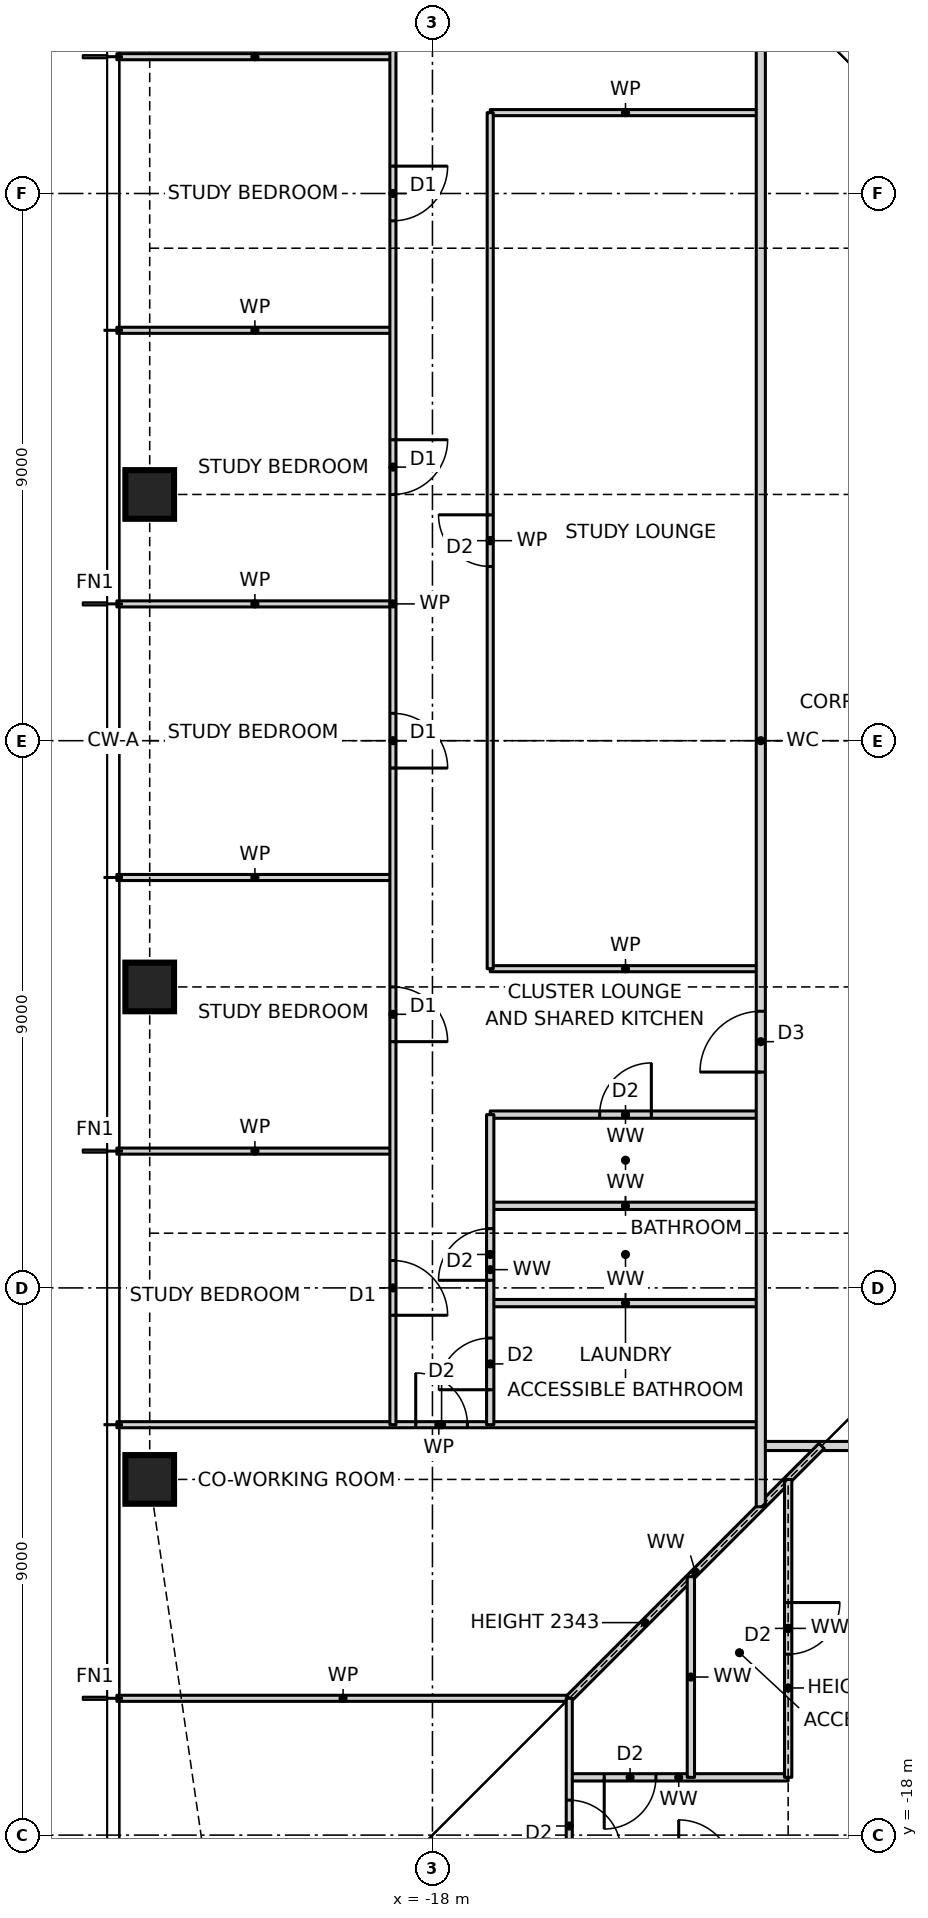
"""IFC4 building model, lengths in metres.
Left out: names, types, materials, properties, quantities, classifications, styles, units other than length and angle.
Written with IfcOpenShell. Run it as: python <this file> out.ifc"""

import sys

from ifc_helpers import new_model, si_unit, direction, frame, frame_2d, origin, origin_2d, place, context, subcontext, project, spatial, rectangle, hollow_rectangle, extrude, element, fill, save


model = new_model("IFC4")
c1 = context("Model", 3, precision=1e-05, world=origin(), true_north=direction((0.0, 1.0)))
c2 = subcontext(c1, "Body", "Model", "MODEL_VIEW")
j1 = project(units=[si_unit("LENGTHUNIT", "METRE"), si_unit("PLANEANGLEUNIT", "RADIAN")], contexts=[c1])
p1 = place(None, origin())
s1 = spatial("IfcSite", under=j1, at=p1, CompositionType="ELEMENT")
p2 = place(p1, origin())
s2 = spatial("IfcBuilding", under=s1, at=p2, CompositionType="ELEMENT")
p3 = place(p2, frame((0.0, 0.0, 46.5)))
s3 = spatial("IfcBuildingStorey", under=s2, at=p3, CompositionType="ELEMENT", Elevation=46.5)
for number, where, z_axis, x_axis in (
    (1, (-22.65, 4.05, 0.0), (0.0, 0.0, 1.0), (1.0, 0.0, 0.0)),
    (2, (-22.65, -4.05, 0.0), (0.0, 0.0, 1.0), (1.0, 0.0, 0.0)),
    (3, (-22.65, -12.15, 0.0), (0.0, 0.0, 1.0), (1.0, 0.0, 0.0)),
):
    element("IfcColumn", number, at=place(p3, frame(where, z_axis=z_axis, x_axis=x_axis)), inside=s3, PredefinedType="COLUMN", context=c2, shape_type="SweptSolid", body=[
        extrude(hollow_rectangle(XDim=0.8, YDim=0.8, WallThickness=0.09, at=origin_2d()), origin(), (0.0, 0.0, 1.0), 3.5),
    ])
p4 = place(p3, frame((-15.75, -17.05, 0.0), z_axis=(0.0, 0.0, 1.0), x_axis=(1.0, 0.0, 0.0)))
e4 = element("IfcWall", 4, at=p4, inside=s3, PredefinedType="PARTITIONING", context=c2, shape_type="SweptSolid", body=[
    extrude(rectangle(XDim=3.6, YDim=0.12, at=frame_2d((1.8, 0.0))), origin(), (0.0, 0.0, 1.0), 3.27),
])
p5 = place(p4, frame((0.575, 0.0, 0.0)))
e5 = element("IfcOpeningElement", 5, at=p5, cuts=e4, PredefinedType="OPENING", context=c2, shape_type="SweptSolid", body=[
    extrude(rectangle(XDim=0.85, YDim=2.1, at=frame_2d((0.425, 1.05))), frame((0.0, 0.07, 0.0), z_axis=(0.0, -1.0, 0.0), x_axis=(1.0, 0.0, 0.0)), (0.0, 0.0, 1.0), 0.14),
])
p6 = place(p3, frame((-23.19, -15.75, 0.0), z_axis=(0.0, 0.0, 1.0), x_axis=(1.0, 0.0, 0.0)))
e6 = element("IfcWall", 6, at=p6, inside=s3, PredefinedType="PARTITIONING", context=c2, shape_type="SweptSolid", body=[
    extrude(rectangle(XDim=7.44, YDim=0.1, at=frame_2d((3.72, 0.0))), origin(), (0.0, 0.0, 1.0), 3.27),
])
p7 = place(p3, frame((-12.6, -11.6, 0.0), z_axis=(0.0, 0.0, 1.0), x_axis=(1.0, 0.0, 0.0)))
e7 = element("IfcWall", 7, at=p7, inside=s3, PredefinedType="PARTITIONING", context=c2, shape_type="SweptSolid", body=[
    extrude(rectangle(XDim=24.2, YDim=0.15, at=frame_2d((12.1, 0.0))), origin(), (0.0, 0.0, 1.0), 3.27),
])
p8 = place(p7, frame((2.64, 0.0, 0.0)))
e8 = element("IfcOpeningElement", 8, at=p8, cuts=e7, PredefinedType="OPENING", context=c2, shape_type="SweptSolid", body=[
    extrude(rectangle(XDim=1.0, YDim=2.1, at=frame_2d((0.5, 1.05))), frame((0.0, 0.085, 0.0), z_axis=(0.0, -1.0, 0.0), x_axis=(1.0, 0.0, 0.0)), (0.0, 0.0, 1.0), 0.17),
])
p9 = place(p7, frame((13.5, 0.0, 0.0)))
e9 = element("IfcOpeningElement", 9, at=p9, cuts=e7, PredefinedType="OPENING", context=c2, shape_type="SweptSolid", body=[
    extrude(rectangle(XDim=0.9, YDim=2.1, at=frame_2d((0.45, 1.05))), frame((0.0, 0.085, 0.0), z_axis=(0.0, -1.0, 0.0), x_axis=(1.0, 0.0, 0.0)), (0.0, 0.0, 1.0), 0.17),
])
p10 = place(p7, frame((22.025, 0.0, 0.0)))
e10 = element("IfcOpeningElement", 10, at=p10, cuts=e7, PredefinedType="OPENING", context=c2, shape_type="SweptSolid", body=[
    extrude(rectangle(XDim=1.0, YDim=2.1, at=frame_2d((0.5, 1.05))), frame((0.0, 0.085, 0.0), z_axis=(0.0, -1.0, 0.0), x_axis=(1.0, 0.0, 0.0)), (0.0, 0.0, 1.0), 0.17),
])
p11 = place(p3, frame((-23.19, -11.25, 0.0), z_axis=(0.0, 0.0, 1.0), x_axis=(1.0, 0.0, 0.0)))
e11 = element("IfcWall", 11, at=p11, inside=s3, PredefinedType="PARTITIONING", context=c2, shape_type="SweptSolid", body=[
    extrude(rectangle(XDim=10.59, YDim=0.1, at=frame_2d((5.295, 0.0))), origin(), (0.0, 0.0, 1.0), 3.27),
])
p12 = place(p11, frame((4.915, 0.0, 0.0)))
e12 = element("IfcOpeningElement", 12, at=p12, cuts=e11, PredefinedType="OPENING", context=c2, shape_type="SweptSolid", body=[
    extrude(rectangle(XDim=0.85, YDim=2.1, at=frame_2d((0.425, 1.05))), frame((0.0, 0.06, 0.0), z_axis=(0.0, -1.0, 0.0), x_axis=(1.0, 0.0, 0.0)), (0.0, 0.0, 1.0), 0.12),
])
for number, where, z_axis, x_axis in (
    (13, (-17.05, -9.25, 0.0), (0.0, 0.0, 1.0), (1.0, 0.0, 0.0)),
    (14, (-17.05, -7.65, 0.0), (0.0, 0.0, 1.0), (1.0, 0.0, 0.0)),
):
    element("IfcWall", number, at=place(p3, frame(where, z_axis=z_axis, x_axis=x_axis)), inside=s3, PredefinedType="PARTITIONING", context=c2, shape_type="SweptSolid", body=[
        extrude(rectangle(XDim=4.45, YDim=0.12, at=frame_2d((2.225, 0.0))), origin(), (0.0, 0.0, 1.0), 3.27),
    ])
p13 = place(p3, frame((-23.19, -6.75, 0.0), z_axis=(0.0, 0.0, 1.0), x_axis=(1.0, 0.0, 0.0)))
e15 = element("IfcWall", 15, at=p13, inside=s3, PredefinedType="PARTITIONING", context=c2, shape_type="SweptSolid", body=[
    extrude(rectangle(XDim=4.54, YDim=0.1, at=frame_2d((2.27, 0.0))), origin(), (0.0, 0.0, 1.0), 3.27),
])
p14 = place(p3, frame((-17.05, -6.15, 0.0), z_axis=(0.0, 0.0, 1.0), x_axis=(1.0, 0.0, 0.0)))
e16 = element("IfcWall", 16, at=p14, inside=s3, PredefinedType="PARTITIONING", context=c2, shape_type="SweptSolid", body=[
    extrude(rectangle(XDim=4.45, YDim=0.12, at=frame_2d((2.225, 0.0))), origin(), (0.0, 0.0, 1.0), 3.27),
])
p15 = place(p14, frame((1.8, 0.0, 0.0)))
e17 = element("IfcOpeningElement", 17, at=p15, cuts=e16, PredefinedType="OPENING", context=c2, shape_type="SweptSolid", body=[
    extrude(rectangle(XDim=0.85, YDim=2.1, at=frame_2d((0.425, 1.05))), frame((0.0, 0.07, 0.0), z_axis=(0.0, -1.0, 0.0), x_axis=(1.0, 0.0, 0.0)), (0.0, 0.0, 1.0), 0.14),
])
p16 = place(p3, frame((-17.05, -3.75, 0.0), z_axis=(0.0, 0.0, 1.0), x_axis=(1.0, 0.0, 0.0)))
e18 = element("IfcWall", 18, at=p16, inside=s3, PredefinedType="PARTITIONING", context=c2, shape_type="SweptSolid", body=[
    extrude(rectangle(XDim=4.45, YDim=0.1, at=frame_2d((2.225, 0.0))), origin(), (0.0, 0.0, 1.0), 3.27),
])
for number, where, z_axis, x_axis in (
    (19, (-23.19, -2.25, 0.0), (0.0, 0.0, 1.0), (1.0, 0.0, 0.0)),
    (20, (-23.19, 2.25, 0.0), (0.0, 0.0, 1.0), (1.0, 0.0, 0.0)),
    (21, (-23.19, 6.75, 0.0), (0.0, 0.0, 1.0), (1.0, 0.0, 0.0)),
):
    element("IfcWall", number, at=place(p3, frame(where, z_axis=z_axis, x_axis=x_axis)), inside=s3, PredefinedType="PARTITIONING", context=c2, shape_type="SweptSolid", body=[
        extrude(rectangle(XDim=4.54, YDim=0.1, at=frame_2d((2.27, 0.0))), origin(), (0.0, 0.0, 1.0), 3.27),
    ])
p17 = place(p3, frame((-17.05, 10.33, 0.0), z_axis=(0.0, 0.0, 1.0), x_axis=(1.0, 0.0, 0.0)))
e22 = element("IfcWall", 22, at=p17, inside=s3, PredefinedType="PARTITIONING", context=c2, shape_type="SweptSolid", body=[
    extrude(rectangle(XDim=4.45, YDim=0.1, at=frame_2d((2.225, 0.0))), origin(), (0.0, 0.0, 1.0), 3.27),
])
p18 = place(p3, frame((-23.19, 11.25, 0.0), z_axis=(0.0, 0.0, 1.0), x_axis=(1.0, 0.0, 0.0)))
e23 = element("IfcWall", 23, at=p18, inside=s3, PredefinedType="PARTITIONING", context=c2, shape_type="SweptSolid", body=[
    extrude(rectangle(XDim=4.54, YDim=0.1, at=frame_2d((2.27, 0.0))), origin(), (0.0, 0.0, 1.0), 3.27),
])
p19 = place(p3, frame((-15.75, -15.75, 0.0), z_axis=(0.0, 0.0, 1.0), x_axis=(0.707106781187, 0.707106781187, 0.0)))
e24 = element("IfcWall", 24, at=p19, inside=s3, PredefinedType="PARTITIONING", context=c2, shape_type="SweptSolid", body=[
    extrude(rectangle(XDim=5.869, YDim=0.12, at=frame_2d((2.935, 0.0))), origin(), (0.0, 0.0, 1.0), 2.343),
])
p20 = place(p3, frame((-12.15, -17.05, 0.0), z_axis=(0.0, 0.0, 1.0), x_axis=(0.0, 1.0, 0.0)))
e25 = element("IfcWall", 25, at=p20, inside=s3, PredefinedType="PARTITIONING", context=c2, shape_type="SweptSolid", body=[
    extrude(rectangle(XDim=4.9, YDim=0.12, at=frame_2d((2.45, 0.0))), origin(), (0.0, 0.0, 1.0), 2.508),
])
p21 = place(p20, frame((2.025, 0.0, 0.0)))
e26 = element("IfcOpeningElement", 26, at=p21, cuts=e25, PredefinedType="OPENING", context=c2, shape_type="SweptSolid", body=[
    extrude(rectangle(XDim=0.85, YDim=2.1, at=frame_2d((0.425, 1.05))), frame((0.0, 0.07, 0.0), z_axis=(0.0, -1.0, 0.0), x_axis=(1.0, 0.0, 0.0)), (0.0, 0.0, 1.0), 0.14),
])
p22 = place(p3, frame((-12.6, -12.6, 0.0), z_axis=(0.0, 0.0, 1.0), x_axis=(0.0, 1.0, 0.0)))
e27 = element("IfcWall", 27, at=p22, inside=s3, PredefinedType="PARTITIONING", context=c2, shape_type="SweptSolid", body=[
    extrude(rectangle(XDim=25.2, YDim=0.15, at=frame_2d((12.6, 0.0))), origin(), (0.0, 0.0, 1.0), 3.27),
])
p23 = place(p22, frame((7.15, 0.0, 0.0)))
e28 = element("IfcOpeningElement", 28, at=p23, cuts=e27, PredefinedType="OPENING", context=c2, shape_type="SweptSolid", body=[
    extrude(rectangle(XDim=1.0, YDim=2.1, at=frame_2d((0.5, 1.05))), frame((0.0, 0.085, 0.0), z_axis=(0.0, -1.0, 0.0), x_axis=(1.0, 0.0, 0.0)), (0.0, 0.0, 1.0), 0.17),
])
p24 = place(p3, frame((-13.75, -17.05, 0.0), z_axis=(0.0, 0.0, 1.0), x_axis=(0.0, 1.0, 0.0)))
e29 = element("IfcWall", 29, at=p24, inside=s3, PredefinedType="PARTITIONING", context=c2, shape_type="SweptSolid", body=[
    extrude(rectangle(XDim=3.3, YDim=0.12, at=frame_2d((1.65, 0.0))), origin(), (0.0, 0.0, 1.0), 3.27),
])
p25 = place(p3, frame((-15.75, -23.19, 0.0), z_axis=(0.0, 0.0, 1.0), x_axis=(0.0, 1.0, 0.0)))
e30 = element("IfcWall", 30, at=p25, inside=s3, PredefinedType="PARTITIONING", context=c2, shape_type="SweptSolid", body=[
    extrude(rectangle(XDim=7.44, YDim=0.1, at=frame_2d((3.72, 0.0))), origin(), (0.0, 0.0, 1.0), 3.27),
])
p26 = place(p25, frame((4.915, 0.0, 0.0)))
e31 = element("IfcOpeningElement", 31, at=p26, cuts=e30, PredefinedType="OPENING", context=c2, shape_type="SweptSolid", body=[
    extrude(rectangle(XDim=0.85, YDim=2.1, at=frame_2d((0.425, 1.05))), frame((0.0, 0.06, 0.0), z_axis=(0.0, -1.0, 0.0), x_axis=(1.0, 0.0, 0.0)), (0.0, 0.0, 1.0), 0.12),
])
p27 = place(p3, frame((-17.05, -11.25, 0.0), z_axis=(0.0, 0.0, 1.0), x_axis=(0.0, 1.0, 0.0)))
e32 = element("IfcWall", 32, at=p27, inside=s3, PredefinedType="PARTITIONING", context=c2, shape_type="SweptSolid", body=[
    extrude(rectangle(XDim=5.1, YDim=0.12, at=frame_2d((2.55, 0.0))), origin(), (0.0, 0.0, 1.0), 3.27),
])
p28 = place(p27, frame((2.375, 0.0, 0.0)))
e33 = element("IfcOpeningElement", 33, at=p28, cuts=e32, PredefinedType="OPENING", context=c2, shape_type="SweptSolid", body=[
    extrude(rectangle(XDim=0.85, YDim=2.1, at=frame_2d((0.425, 1.05))), frame((0.0, 0.07, 0.0), z_axis=(0.0, -1.0, 0.0), x_axis=(1.0, 0.0, 0.0)), (0.0, 0.0, 1.0), 0.14),
])
p29 = place(p27, frame((0.575, 0.0, 0.0)))
e34 = element("IfcOpeningElement", 34, at=p29, cuts=e32, PredefinedType="OPENING", context=c2, shape_type="SweptSolid", body=[
    extrude(rectangle(XDim=0.85, YDim=2.1, at=frame_2d((0.425, 1.05))), frame((0.0, 0.07, 0.0), z_axis=(0.0, -1.0, 0.0), x_axis=(1.0, 0.0, 0.0)), (0.0, 0.0, 1.0), 0.14),
])
p30 = place(p3, frame((-17.05, -3.75, 0.0), z_axis=(0.0, 0.0, 1.0), x_axis=(0.0, 1.0, 0.0)))
e35 = element("IfcWall", 35, at=p30, inside=s3, PredefinedType="PARTITIONING", context=c2, shape_type="SweptSolid", body=[
    extrude(rectangle(XDim=14.08, YDim=0.1, at=frame_2d((7.04, 0.0))), origin(), (0.0, 0.0, 1.0), 3.27),
])
p31 = place(p30, frame((6.615, 0.0, 0.0)))
e36 = element("IfcOpeningElement", 36, at=p31, cuts=e35, PredefinedType="OPENING", context=c2, shape_type="SweptSolid", body=[
    extrude(rectangle(XDim=0.85, YDim=2.1, at=frame_2d((0.425, 1.05))), frame((0.0, 0.06, 0.0), z_axis=(0.0, -1.0, 0.0), x_axis=(1.0, 0.0, 0.0)), (0.0, 0.0, 1.0), 0.12),
])
p32 = place(p3, frame((-18.65, -11.25, 0.0), z_axis=(0.0, 0.0, 1.0), x_axis=(0.0, 1.0, 0.0)))
e37 = element("IfcWall", 37, at=p32, inside=s3, PredefinedType="PARTITIONING", context=c2, shape_type="SweptSolid", body=[
    extrude(rectangle(XDim=27.0, YDim=0.1, at=frame_2d((13.5, 0.0))), origin(), (0.0, 0.0, 1.0), 3.27),
])
p33 = place(p32, frame((24.3, 0.0, 0.0)))
e38 = element("IfcOpeningElement", 38, at=p33, cuts=e37, PredefinedType="OPENING", context=c2, shape_type="SweptSolid", body=[
    extrude(rectangle(XDim=0.9, YDim=2.1, at=frame_2d((0.45, 1.05))), frame((0.0, 0.06, 0.0), z_axis=(0.0, -1.0, 0.0), x_axis=(1.0, 0.0, 0.0)), (0.0, 0.0, 1.0), 0.12),
])
p34 = place(p32, frame((19.8, 0.0, 0.0)))
e39 = element("IfcOpeningElement", 39, at=p34, cuts=e37, PredefinedType="OPENING", context=c2, shape_type="SweptSolid", body=[
    extrude(rectangle(XDim=0.9, YDim=2.1, at=frame_2d((0.45, 1.05))), frame((0.0, 0.06, 0.0), z_axis=(0.0, -1.0, 0.0), x_axis=(1.0, 0.0, 0.0)), (0.0, 0.0, 1.0), 0.12),
])
p35 = place(p32, frame((15.3, 0.0, 0.0)))
e40 = element("IfcOpeningElement", 40, at=p35, cuts=e37, PredefinedType="OPENING", context=c2, shape_type="SweptSolid", body=[
    extrude(rectangle(XDim=0.9, YDim=2.1, at=frame_2d((0.45, 1.05))), frame((0.0, 0.06, 0.0), z_axis=(0.0, -1.0, 0.0), x_axis=(1.0, 0.0, 0.0)), (0.0, 0.0, 1.0), 0.12),
])
p36 = place(p32, frame((10.8, 0.0, 0.0)))
e41 = element("IfcOpeningElement", 41, at=p36, cuts=e37, PredefinedType="OPENING", context=c2, shape_type="SweptSolid", body=[
    extrude(rectangle(XDim=0.9, YDim=2.1, at=frame_2d((0.45, 1.05))), frame((0.0, 0.06, 0.0), z_axis=(0.0, -1.0, 0.0), x_axis=(1.0, 0.0, 0.0)), (0.0, 0.0, 1.0), 0.12),
])
p37 = place(p32, frame((6.3, 0.0, 0.0)))
e42 = element("IfcOpeningElement", 42, at=p37, cuts=e37, PredefinedType="OPENING", context=c2, shape_type="SweptSolid", body=[
    extrude(rectangle(XDim=0.9, YDim=2.1, at=frame_2d((0.45, 1.05))), frame((0.0, 0.06, 0.0), z_axis=(0.0, -1.0, 0.0), x_axis=(1.0, 0.0, 0.0)), (0.0, 0.0, 1.0), 0.12),
])
p38 = place(p32, frame((1.8, 0.0, 0.0)))
e43 = element("IfcOpeningElement", 43, at=p38, cuts=e37, PredefinedType="OPENING", context=c2, shape_type="SweptSolid", body=[
    extrude(rectangle(XDim=0.9, YDim=2.1, at=frame_2d((0.45, 1.05))), frame((0.0, 0.06, 0.0), z_axis=(0.0, -1.0, 0.0), x_axis=(1.0, 0.0, 0.0)), (0.0, 0.0, 1.0), 0.12),
])
p39 = place(p5, frame((0.85, 0.0, 0.0), z_axis=(0.0, 0.0, 1.0), x_axis=(-1.0, 0.0, 0.0)))
e44 = element("IfcDoor", 44, at=p39, inside=s3, OperationType="SINGLE_SWING_RIGHT", PredefinedType="DOOR", context=c2, shape_type="SweptSolid", body=[
    extrude(rectangle(XDim=0.85, YDim=2.1, at=frame_2d((0.425, 1.05))), frame((0.0, 0.025, 0.0), z_axis=(0.0, -1.0, 0.0), x_axis=(1.0, 0.0, 0.0)), (0.0, 0.0, 1.0), 0.05),
])
fill(e5, e44)
p40 = place(p21, frame((0.85, 0.0, 0.0), z_axis=(0.0, 0.0, 1.0), x_axis=(-1.0, 0.0, 0.0)))
e45 = element("IfcDoor", 45, at=p40, inside=s3, OperationType="SINGLE_SWING_LEFT", PredefinedType="DOOR", context=c2, shape_type="SweptSolid", body=[
    extrude(rectangle(XDim=0.85, YDim=2.1, at=frame_2d((0.425, 1.05))), frame((0.0, 0.025, 0.0), z_axis=(0.0, -1.0, 0.0), x_axis=(1.0, 0.0, 0.0)), (0.0, 0.0, 1.0), 0.05),
])
fill(e26, e45)
p41 = place(p34, frame((0.9, 0.0, 0.0), z_axis=(0.0, 0.0, 1.0), x_axis=(-1.0, 0.0, 0.0)))
e46 = element("IfcDoor", 46, at=p41, inside=s3, OperationType="SINGLE_SWING_LEFT", PredefinedType="DOOR", context=c2, shape_type="SweptSolid", body=[
    extrude(rectangle(XDim=0.9, YDim=2.1, at=frame_2d((0.45, 1.05))), frame((0.0, 0.025, 0.0), z_axis=(0.0, -1.0, 0.0), x_axis=(1.0, 0.0, 0.0)), (0.0, 0.0, 1.0), 0.05),
])
fill(e39, e46)
p42 = place(p35, frame((0.9, 0.0, 0.0), z_axis=(0.0, 0.0, 1.0), x_axis=(-1.0, 0.0, 0.0)))
e47 = element("IfcDoor", 47, at=p42, inside=s3, OperationType="SINGLE_SWING_LEFT", PredefinedType="DOOR", context=c2, shape_type="SweptSolid", body=[
    extrude(rectangle(XDim=0.9, YDim=2.1, at=frame_2d((0.45, 1.05))), frame((0.0, 0.025, 0.0), z_axis=(0.0, -1.0, 0.0), x_axis=(1.0, 0.0, 0.0)), (0.0, 0.0, 1.0), 0.05),
])
fill(e40, e47)
p43 = place(p36, frame((0.9, 0.0, 0.0), z_axis=(0.0, 0.0, 1.0), x_axis=(-1.0, 0.0, 0.0)))
e48 = element("IfcDoor", 48, at=p43, inside=s3, OperationType="SINGLE_SWING_RIGHT", PredefinedType="DOOR", context=c2, shape_type="SweptSolid", body=[
    extrude(rectangle(XDim=0.9, YDim=2.1, at=frame_2d((0.45, 1.05))), frame((0.0, 0.025, 0.0), z_axis=(0.0, -1.0, 0.0), x_axis=(1.0, 0.0, 0.0)), (0.0, 0.0, 1.0), 0.05),
])
fill(e41, e48)
p44 = place(p37, frame((0.9, 0.0, 0.0), z_axis=(0.0, 0.0, 1.0), x_axis=(-1.0, 0.0, 0.0)))
e49 = element("IfcDoor", 49, at=p44, inside=s3, OperationType="SINGLE_SWING_RIGHT", PredefinedType="DOOR", context=c2, shape_type="SweptSolid", body=[
    extrude(rectangle(XDim=0.9, YDim=2.1, at=frame_2d((0.45, 1.05))), frame((0.0, 0.025, 0.0), z_axis=(0.0, -1.0, 0.0), x_axis=(1.0, 0.0, 0.0)), (0.0, 0.0, 1.0), 0.05),
])
fill(e42, e49)
p45 = place(p38, frame((0.9, 0.0, 0.0), z_axis=(0.0, 0.0, 1.0), x_axis=(-1.0, 0.0, 0.0)))
e50 = element("IfcDoor", 50, at=p45, inside=s3, OperationType="SINGLE_SWING_RIGHT", PredefinedType="DOOR", context=c2, shape_type="SweptSolid", body=[
    extrude(rectangle(XDim=0.9, YDim=2.1, at=frame_2d((0.45, 1.05))), frame((0.0, 0.025, 0.0), z_axis=(0.0, -1.0, 0.0), x_axis=(1.0, 0.0, 0.0)), (0.0, 0.0, 1.0), 0.05),
])
fill(e43, e50)
p46 = place(p23, origin())
e51 = element("IfcDoor", 51, at=p46, inside=s3, OperationType="SINGLE_SWING_LEFT", PredefinedType="DOOR", context=c2, shape_type="SweptSolid", body=[
    extrude(rectangle(XDim=1.0, YDim=2.1, at=frame_2d((0.5, 1.05))), frame((0.0, 0.025, 0.0), z_axis=(0.0, -1.0, 0.0), x_axis=(1.0, 0.0, 0.0)), (0.0, 0.0, 1.0), 0.05),
])
fill(e28, e51)
p47 = place(p31, origin())
e52 = element("IfcDoor", 52, at=p47, inside=s3, OperationType="SINGLE_SWING_RIGHT", PredefinedType="DOOR", context=c2, shape_type="SweptSolid", body=[
    extrude(rectangle(XDim=0.85, YDim=2.1, at=frame_2d((0.425, 1.05))), frame((0.0, 0.025, 0.0), z_axis=(0.0, -1.0, 0.0), x_axis=(1.0, 0.0, 0.0)), (0.0, 0.0, 1.0), 0.05),
])
fill(e36, e52)
p48 = place(p15, origin())
e53 = element("IfcDoor", 53, at=p48, inside=s3, OperationType="SINGLE_SWING_RIGHT", PredefinedType="DOOR", context=c2, shape_type="SweptSolid", body=[
    extrude(rectangle(XDim=0.85, YDim=2.1, at=frame_2d((0.425, 1.05))), frame((0.0, 0.025, 0.0), z_axis=(0.0, -1.0, 0.0), x_axis=(1.0, 0.0, 0.0)), (0.0, 0.0, 1.0), 0.05),
])
fill(e17, e53)
p49 = place(p28, origin())
e54 = element("IfcDoor", 54, at=p49, inside=s3, OperationType="SINGLE_SWING_LEFT", PredefinedType="DOOR", context=c2, shape_type="SweptSolid", body=[
    extrude(rectangle(XDim=0.85, YDim=2.1, at=frame_2d((0.425, 1.05))), frame((0.0, 0.025, 0.0), z_axis=(0.0, -1.0, 0.0), x_axis=(1.0, 0.0, 0.0)), (0.0, 0.0, 1.0), 0.05),
])
fill(e33, e54)
p50 = place(p29, origin())
e55 = element("IfcDoor", 55, at=p50, inside=s3, OperationType="SINGLE_SWING_LEFT", PredefinedType="DOOR", context=c2, shape_type="SweptSolid", body=[
    extrude(rectangle(XDim=0.85, YDim=2.1, at=frame_2d((0.425, 1.05))), frame((0.0, 0.025, 0.0), z_axis=(0.0, -1.0, 0.0), x_axis=(1.0, 0.0, 0.0)), (0.0, 0.0, 1.0), 0.05),
])
fill(e34, e55)
p51 = place(p12, origin())
e56 = element("IfcDoor", 56, at=p51, inside=s3, OperationType="SINGLE_SWING_LEFT", PredefinedType="DOOR", context=c2, shape_type="SweptSolid", body=[
    extrude(rectangle(XDim=0.85, YDim=2.1, at=frame_2d((0.425, 1.05))), frame((0.0, 0.025, 0.0), z_axis=(0.0, -1.0, 0.0), x_axis=(1.0, 0.0, 0.0)), (0.0, 0.0, 1.0), 0.05),
])
fill(e12, e56)
p52 = place(p26, frame((0.85, 0.0, 0.0), z_axis=(0.0, 0.0, 1.0), x_axis=(-1.0, 0.0, 0.0)))
e57 = element("IfcDoor", 57, at=p52, inside=s3, OperationType="SINGLE_SWING_RIGHT", PredefinedType="DOOR", context=c2, shape_type="SweptSolid", body=[
    extrude(rectangle(XDim=0.85, YDim=2.1, at=frame_2d((0.425, 1.05))), frame((0.0, 0.025, 0.0), z_axis=(0.0, -1.0, 0.0), x_axis=(1.0, 0.0, 0.0)), (0.0, 0.0, 1.0), 0.05),
])
fill(e31, e57)
save(model, sys.argv[1])
